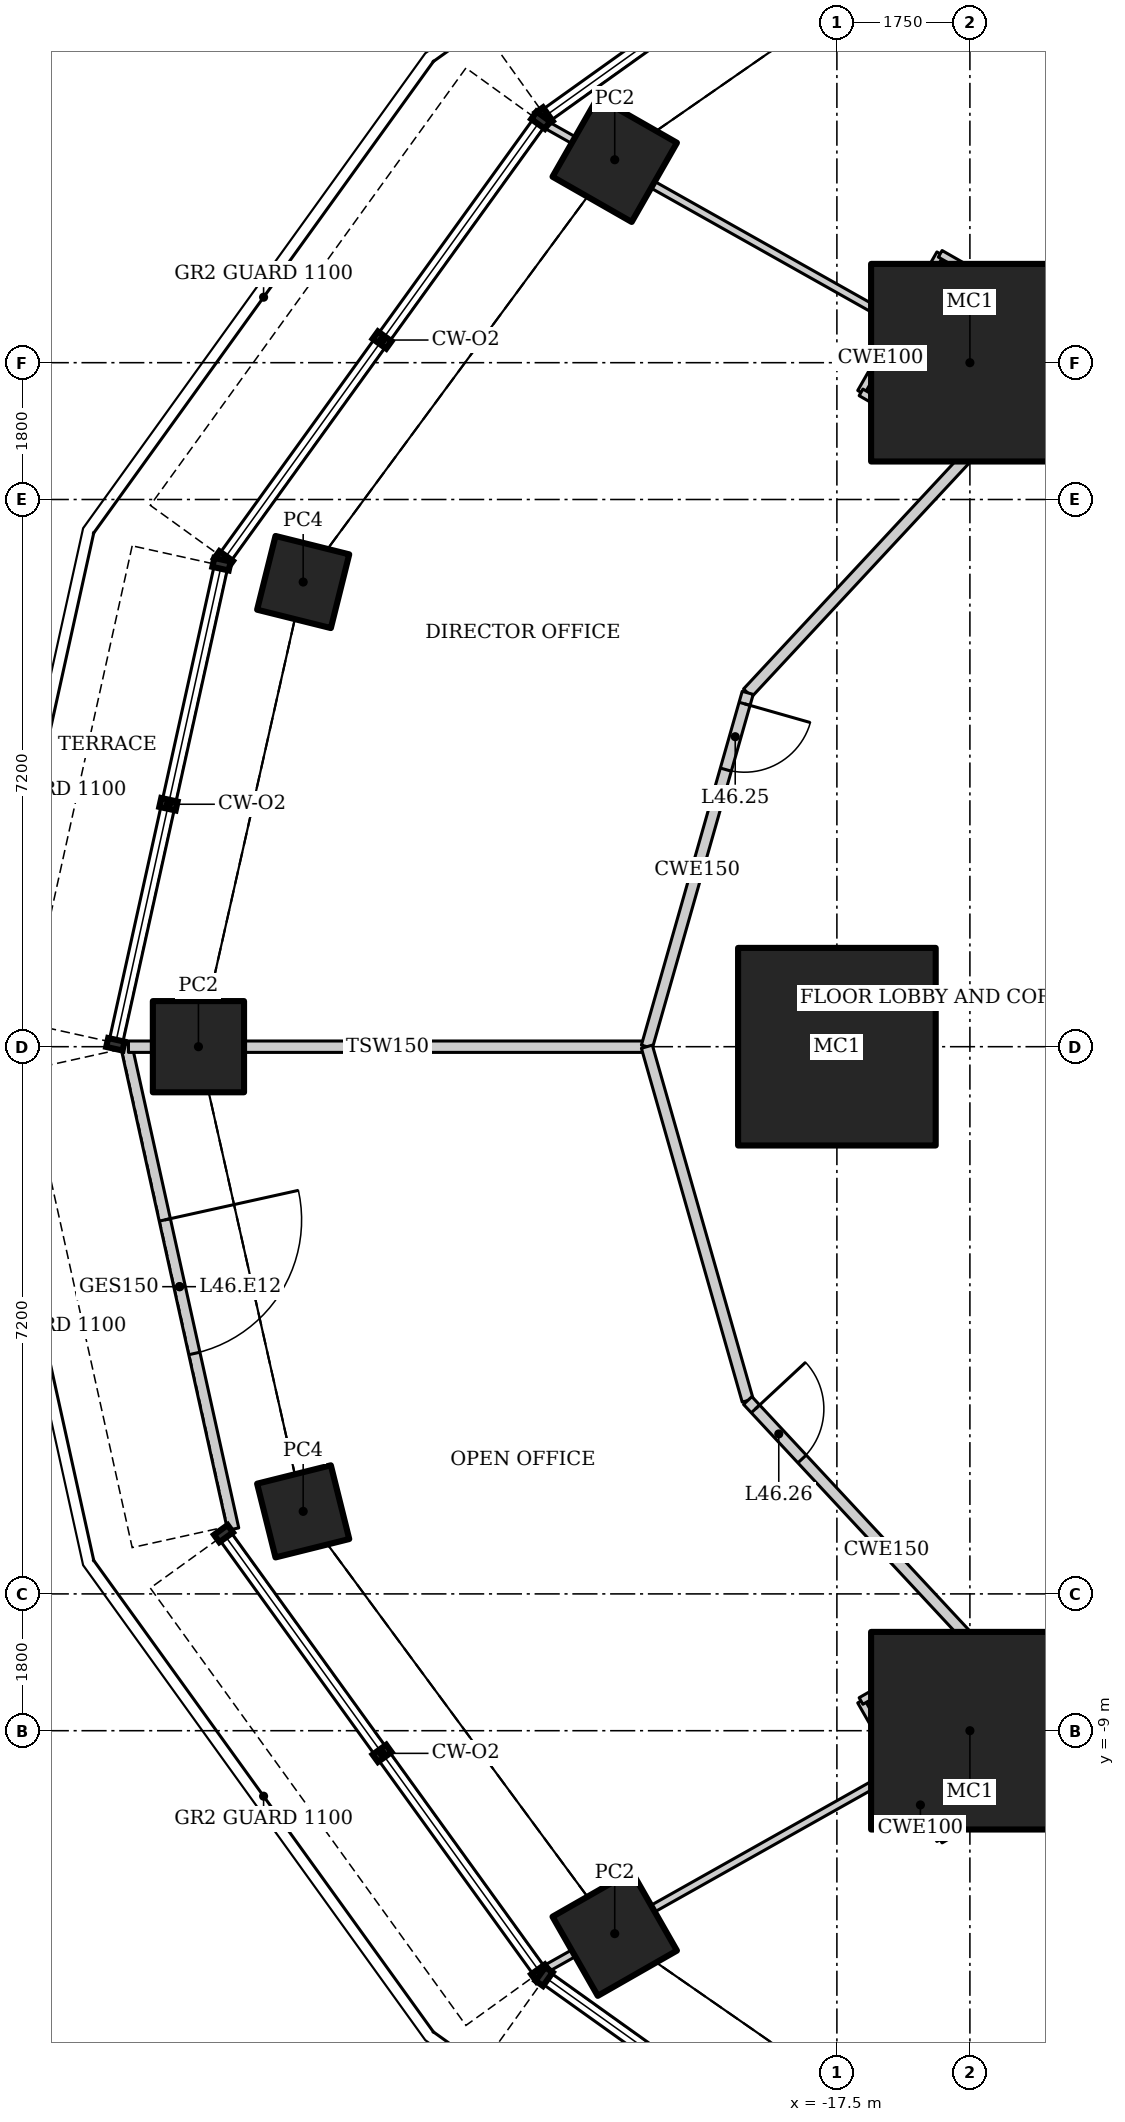
"""IFC4 building model, lengths in metres.
Left out: names, types, materials, properties, quantities, classifications, styles, units other than length and angle.
Written with IfcOpenShell. Run it as: python <this file> out.ifc"""

import sys

from ifc_helpers import new_model, si_unit, direction, frame, frame_2d, origin, origin_2d, place, context, subcontext, project, spatial, rectangle, hollow_rectangle, extrude, element, fill, save


model = new_model("IFC4")
c1 = context("Model", 3, precision=1e-05, world=origin(), true_north=direction((0.0, 1.0)))
c2 = subcontext(c1, "Body", "Model", "MODEL_VIEW")
j1 = project(units=[si_unit("LENGTHUNIT", "METRE"), si_unit("PLANEANGLEUNIT", "RADIAN")], contexts=[c1])
p1 = place(None, origin())
s1 = spatial("IfcSite", under=j1, at=p1, CompositionType="ELEMENT")
p2 = place(p1, origin())
s2 = spatial("IfcBuilding", under=s1, at=p2, CompositionType="ELEMENT")
p3 = place(p2, frame((0.0, 0.0, 199.0)))
s3 = spatial("IfcBuildingStorey", under=s2, at=p3, CompositionType="ELEMENT", Elevation=199.0)
for number, where, z_axis, x_axis in (
    (1, (-15.75, 9.0, 0.0), (0.0, 0.0, 1.0), (1.0, 0.0, 0.0)),
    (2, (-17.5, 0.0, 0.0), (0.0, 0.0, 1.0), (1.0, 0.0, 0.0)),
    (3, (-15.75, -9.0, 0.0), (0.0, 0.0, 1.0), (1.0, 0.0, 0.0)),
):
    element("IfcColumn", number, at=place(p3, frame(where, z_axis=z_axis, x_axis=x_axis)), inside=s3, PredefinedType="COLUMN", context=c2, shape_type="SweptSolid", body=[
        extrude(hollow_rectangle(XDim=2.6, YDim=2.6, WallThickness=0.13, at=origin_2d()), origin(), (0.0, 0.0, 1.0), 4.2),
    ])
p4 = place(p3, frame((-20.423, 11.67, 1.142), z_axis=(0.0, 0.0, 1.0), x_axis=(0.496139221777, 0.86824298017, 0.0)))
e4 = element("IfcColumn", 4, at=p4, inside=s3, PredefinedType="COLUMN", context=c2, shape_type="SweptSolid", body=[
    extrude(hollow_rectangle(XDim=1.2, YDim=1.2, WallThickness=0.1, at=origin_2d()), origin(), (0.0, 0.0, 1.0), 3.058),
])
p5 = place(p3, frame((-24.522, 6.114, 1.131), z_axis=(0.0, 0.0, 1.0), x_axis=(0.2419218956, 0.970295726276, 0.0)))
e5 = element("IfcColumn", 5, at=p5, inside=s3, PredefinedType="COLUMN", context=c2, shape_type="SweptSolid", body=[
    extrude(hollow_rectangle(XDim=1.0, YDim=1.0, WallThickness=0.08, at=origin_2d()), origin(), (0.0, 0.0, 1.0), 3.069),
])
p6 = place(p3, frame((-25.9, 0.0, 1.316), z_axis=(0.0, 0.0, 1.0), x_axis=(1.0, 0.0, 0.0)))
e6 = element("IfcColumn", 6, at=p6, inside=s3, PredefinedType="COLUMN", context=c2, shape_type="SweptSolid", body=[
    extrude(hollow_rectangle(XDim=1.2, YDim=1.2, WallThickness=0.1, at=origin_2d()), origin(), (0.0, 0.0, 1.0), 2.884),
])
p7 = place(p3, frame((-24.522, -6.114, 1.131), z_axis=(0.0, 0.0, 1.0), x_axis=(0.970295726276, 0.2419218956, 0.0)))
e7 = element("IfcColumn", 7, at=p7, inside=s3, PredefinedType="COLUMN", context=c2, shape_type="SweptSolid", body=[
    extrude(hollow_rectangle(XDim=1.0, YDim=1.0, WallThickness=0.08, at=origin_2d()), origin(), (0.0, 0.0, 1.0), 3.069),
])
p8 = place(p3, frame((-20.423, -11.67, 1.142), z_axis=(0.0, 0.0, 1.0), x_axis=(0.86824298017, 0.496139221777, 0.0)))
e8 = element("IfcColumn", 8, at=p8, inside=s3, PredefinedType="COLUMN", context=c2, shape_type="SweptSolid", body=[
    extrude(hollow_rectangle(XDim=1.2, YDim=1.2, WallThickness=0.1, at=origin_2d()), origin(), (0.0, 0.0, 1.0), 3.058),
])
p9 = place(p3, frame((-26.854, 0.032, 0.0), z_axis=(0.0, 0.0, 1.0), x_axis=(0.215885915817, -0.976418594329, 0.0)))
e9 = element("IfcWall", 9, at=p9, inside=s3, PredefinedType="ELEMENTEDWALL", context=c2, shape_type="SweptSolid", body=[
    extrude(rectangle(XDim=6.534, YDim=0.15, at=frame_2d((3.267, 0.0))), origin(), (0.0, 0.0, 1.0), 4.05),
])
p10 = place(p9, frame((2.367, 0.0, 0.0)))
e10 = element("IfcOpeningElement", 10, at=p10, cuts=e9, PredefinedType="OPENING", context=c2, shape_type="SweptSolid", body=[
    extrude(rectangle(XDim=1.8, YDim=2.4, at=frame_2d((0.9, 1.2))), frame((0.0, 0.085, 0.0), z_axis=(0.0, -1.0, 0.0), x_axis=(1.0, 0.0, 0.0)), (0.0, 0.0, 1.0), 0.17),
])
p11 = place(p3, frame((-21.358, 12.15, 0.0), z_axis=(0.0, 0.0, 1.0), x_axis=(0.871488555694, -0.490415841195, 0.0)))
e11 = element("IfcWall", 11, at=p11, inside=s3, PredefinedType="PARTITIONING", context=c2, shape_type="SweptSolid", body=[
    extrude(rectangle(XDim=7.272, YDim=0.1, at=frame_2d((3.636, 0.0))), origin(), (0.0, 0.0, 1.0), 2.85),
])
p12 = place(p3, frame((-26.821, 0.0, 0.0), z_axis=(0.0, 0.0, 1.0), x_axis=(1.0, 0.0, 0.0)))
e12 = element("IfcWall", 12, at=p12, inside=s3, PredefinedType="PARTITIONING", context=c2, shape_type="SweptSolid", body=[
    extrude(rectangle(XDim=6.821, YDim=0.15, at=frame_2d((3.41, 0.0))), origin(), (0.0, 0.0, 1.0), 2.85),
])
p13 = place(p3, frame((-21.358, -12.15, 0.0), z_axis=(0.0, 0.0, 1.0), x_axis=(0.871488555694, 0.490415841195, 0.0)))
e13 = element("IfcWall", 13, at=p13, inside=s3, PredefinedType="PARTITIONING", context=c2, shape_type="SweptSolid", body=[
    extrude(rectangle(XDim=7.272, YDim=0.1, at=frame_2d((3.636, 0.0))), origin(), (0.0, 0.0, 1.0), 2.85),
])
p14 = place(p3, frame((-10.633, 11.01, 0.0), z_axis=(0.0, 0.0, 1.0), x_axis=(-0.875044572696, -0.484042349176, 0.0)))
e14 = element("IfcWall", 14, at=p14, inside=s3, PredefinedType="PARTITIONING", context=c2, shape_type="SweptSolid", body=[
    extrude(rectangle(XDim=5.015, YDim=0.15, at=frame_2d((2.507, 0.0))), origin(), (0.0, 0.0, 1.0), 4.05),
])
p15 = place(p3, frame((-15.021, 8.583, 0.0), z_axis=(0.0, 0.0, 1.0), x_axis=(-0.681014838837, -0.732269615158, 0.0)))
e15 = element("IfcWall", 15, at=p15, inside=s3, PredefinedType="PARTITIONING", context=c2, shape_type="SweptSolid", body=[
    extrude(rectangle(XDim=5.364, YDim=0.15, at=frame_2d((2.682, 0.0))), origin(), (0.0, 0.0, 1.0), 4.05),
])
p16 = place(p3, frame((-18.673, 4.656, 0.0), z_axis=(0.0, 0.0, 1.0), x_axis=(-0.274041669067, -0.961717819121, 0.0)))
e16 = element("IfcWall", 16, at=p16, inside=s3, PredefinedType="PARTITIONING", context=c2, shape_type="SweptSolid", body=[
    extrude(rectangle(XDim=4.841, YDim=0.15, at=frame_2d((2.42, 0.0))), origin(), (0.0, 0.0, 1.0), 4.05),
])
p17 = place(p16, frame((0.15, 0.0, 0.0)))
e17 = element("IfcOpeningElement", 17, at=p17, cuts=e16, PredefinedType="OPENING", context=c2, shape_type="SweptSolid", body=[
    extrude(rectangle(XDim=0.9, YDim=2.1, at=frame_2d((0.45, 1.05))), frame((0.0, 0.085, 0.0), z_axis=(0.0, -1.0, 0.0), x_axis=(1.0, 0.0, 0.0)), (0.0, 0.0, 1.0), 0.17),
])
p18 = place(p3, frame((-20.0, 0.0, 0.0), z_axis=(0.0, 0.0, 1.0), x_axis=(0.274041669067, -0.961717819121, 0.0)))
e18 = element("IfcWall", 18, at=p18, inside=s3, PredefinedType="PARTITIONING", context=c2, shape_type="SweptSolid", body=[
    extrude(rectangle(XDim=4.841, YDim=0.15, at=frame_2d((2.42, 0.0))), origin(), (0.0, 0.0, 1.0), 4.05),
])
p19 = place(p3, frame((-18.673, -4.656, 0.0), z_axis=(0.0, 0.0, 1.0), x_axis=(0.681014838837, -0.732269615158, 0.0)))
e19 = element("IfcWall", 19, at=p19, inside=s3, PredefinedType="PARTITIONING", context=c2, shape_type="SweptSolid", body=[
    extrude(rectangle(XDim=5.364, YDim=0.15, at=frame_2d((2.682, 0.0))), origin(), (0.0, 0.0, 1.0), 4.05),
])
p20 = place(p19, frame((0.15, 0.0, 0.0)))
e20 = element("IfcOpeningElement", 20, at=p20, cuts=e19, PredefinedType="OPENING", context=c2, shape_type="SweptSolid", body=[
    extrude(rectangle(XDim=0.9, YDim=2.1, at=frame_2d((0.45, 1.05))), frame((0.0, 0.085, 0.0), z_axis=(0.0, -1.0, 0.0), x_axis=(1.0, 0.0, 0.0)), (0.0, 0.0, 1.0), 0.17),
])
p21 = place(p3, frame((-15.021, -8.583, 0.0), z_axis=(0.0, 0.0, 1.0), x_axis=(0.875044572696, -0.484042349176, 0.0)))
e21 = element("IfcWall", 21, at=p21, inside=s3, PredefinedType="PARTITIONING", context=c2, shape_type="SweptSolid", body=[
    extrude(rectangle(XDim=5.015, YDim=0.15, at=frame_2d((2.507, 0.0))), origin(), (0.0, 0.0, 1.0), 4.05),
])
p22 = place(p3, frame((-17.183, 8.609, 0.0), z_axis=(0.0, 0.0, 1.0), x_axis=(0.496214951439, 0.868199701664, 0.0)))
e22 = element("IfcWall", 22, at=p22, inside=s3, PredefinedType="PARTITIONING", context=c2, shape_type="SweptSolid", body=[
    extrude(rectangle(XDim=1.038, YDim=0.1, at=frame_2d((0.519, 0.0))), origin(), (0.0, 0.0, 1.0), 4.05),
])
for number, where, z_axis, x_axis in (
    (23, (-16.662, 9.521, 0.0), (0.0, 0.0, 1.0), (0.496, 0.868, 0.0)),
    (24, (-16.141, 10.433, 0.0), (0.0, 0.0, 1.0), (0.868, -0.496, 0.0)),
):
    element("IfcWall", number, at=place(p3, frame(where, z_axis=z_axis, x_axis=x_axis)), inside=s3, PredefinedType="PARTITIONING", context=c2, shape_type="SweptSolid", body=[
        extrude(rectangle(XDim=1.05, YDim=0.1, at=frame_2d((0.525, 0.0))), origin(), (0.0, 0.0, 1.0), 4.05),
    ])
p23 = place(p3, frame((-15.229, 9.912, 0.0), z_axis=(0.0, 0.0, 1.0), x_axis=(0.868243142124, -0.496138938357, 0.0)))
e25 = element("IfcWall", 25, at=p23, inside=s3, PredefinedType="PARTITIONING", context=c2, shape_type="SweptSolid", body=[
    extrude(rectangle(XDim=1.478, YDim=0.1, at=frame_2d((0.739, 0.0))), origin(), (0.0, 0.0, 1.0), 4.05),
])
p24 = place(p3, frame((-15.755, 7.794, 0.0), z_axis=(0.0, 0.0, 1.0), x_axis=(-0.868318998063, 0.496006166901, 0.0)))
e26 = element("IfcWall", 26, at=p24, inside=s3, PredefinedType="PARTITIONING", context=c2, shape_type="SweptSolid", body=[
    extrude(rectangle(XDim=0.594, YDim=0.1, at=frame_2d((0.297, 0.0))), origin(), (0.0, 0.0, 1.0), 4.05),
])
for number, where, z_axis, x_axis in (
    (27, (-16.271, 8.088, 0.0), (0.0, 0.0, 1.0), (-0.868, 0.496, 0.0)),
    (28, (-16.141, -10.433, 0.0), (0.0, 0.0, 1.0), (-0.496, 0.868, 0.0)),
):
    element("IfcWall", number, at=place(p3, frame(where, z_axis=z_axis, x_axis=x_axis)), inside=s3, PredefinedType="PARTITIONING", context=c2, shape_type="SweptSolid", body=[
        extrude(rectangle(XDim=1.05, YDim=0.1, at=frame_2d((0.525, 0.0))), origin(), (0.0, 0.0, 1.0), 4.05),
    ])
p25 = place(p3, frame((-16.668, -9.51, 0.0), z_axis=(0.0, 0.0, 1.0), x_axis=(-0.496214951439, 0.868199701664, 0.0)))
e29 = element("IfcWall", 29, at=p25, inside=s3, PredefinedType="PARTITIONING", context=c2, shape_type="SweptSolid", body=[
    extrude(rectangle(XDim=1.038, YDim=0.1, at=frame_2d((0.519, 0.0))), origin(), (0.0, 0.0, 1.0), 4.05),
])
p26 = place(p3, frame((-17.183, -8.609, 0.0), z_axis=(0.0, 0.0, 1.0), x_axis=(0.868214523334, 0.496189017888, 0.0)))
e30 = element("IfcWall", 30, at=p26, inside=s3, PredefinedType="PARTITIONING", context=c2, shape_type="SweptSolid", body=[
    extrude(rectangle(XDim=1.05, YDim=0.1, at=frame_2d((0.525, 0.0))), origin(), (0.0, 0.0, 1.0), 4.05),
])
p27 = place(p3, frame((-16.271, -8.088, 0.0), z_axis=(0.0, 0.0, 1.0), x_axis=(0.868318998063, 0.496006166901, 0.0)))
e31 = element("IfcWall", 31, at=p27, inside=s3, PredefinedType="PARTITIONING", context=c2, shape_type="SweptSolid", body=[
    extrude(rectangle(XDim=0.594, YDim=0.1, at=frame_2d((0.297, 0.0))), origin(), (0.0, 0.0, 1.0), 4.05),
])
p28 = place(p3, frame((-13.946, -9.178, 0.0), z_axis=(0.0, 0.0, 1.0), x_axis=(-0.868243142124, -0.496138938357, 0.0)))
e32 = element("IfcWall", 32, at=p28, inside=s3, PredefinedType="PARTITIONING", context=c2, shape_type="SweptSolid", body=[
    extrude(rectangle(XDim=1.478, YDim=0.1, at=frame_2d((0.739, 0.0))), origin(), (0.0, 0.0, 1.0), 4.05),
])
p29 = place(p3, frame((-15.229, -9.912, 0.0), z_axis=(0.0, 0.0, 1.0), x_axis=(-0.868214523334, -0.496189017888, 0.0)))
e33 = element("IfcWall", 33, at=p29, inside=s3, PredefinedType="PARTITIONING", context=c2, shape_type="SweptSolid", body=[
    extrude(rectangle(XDim=1.05, YDim=0.1, at=frame_2d((0.525, 0.0))), origin(), (0.0, 0.0, 1.0), 4.05),
])
p30 = place(p10, origin())
e34 = element("IfcDoor", 34, at=p30, inside=s3, OperationType="DOUBLE_DOOR_DOUBLE_SWING", PredefinedType="DOOR", context=c2, shape_type="SweptSolid", body=[
    extrude(rectangle(XDim=1.8, YDim=2.4, at=frame_2d((0.9, 1.2))), frame((0.0, 0.025, 0.0), z_axis=(0.0, -1.0, 0.0), x_axis=(1.0, 0.0, 0.0)), (0.0, 0.0, 1.0), 0.05),
])
fill(e10, e34)
p31 = place(p17, origin())
e35 = element("IfcDoor", 35, at=p31, inside=s3, OperationType="SINGLE_SWING_LEFT", PredefinedType="DOOR", context=c2, shape_type="SweptSolid", body=[
    extrude(rectangle(XDim=0.9, YDim=2.1, at=frame_2d((0.45, 1.05))), frame((0.0, 0.025, 0.0), z_axis=(0.0, -1.0, 0.0), x_axis=(1.0, 0.0, 0.0)), (0.0, 0.0, 1.0), 0.05),
])
fill(e17, e35)
p32 = place(p20, origin())
e36 = element("IfcDoor", 36, at=p32, inside=s3, OperationType="SINGLE_SWING_LEFT", PredefinedType="DOOR", context=c2, shape_type="SweptSolid", body=[
    extrude(rectangle(XDim=0.9, YDim=2.1, at=frame_2d((0.45, 1.05))), frame((0.0, 0.025, 0.0), z_axis=(0.0, -1.0, 0.0), x_axis=(1.0, 0.0, 0.0)), (0.0, 0.0, 1.0), 0.05),
])
fill(e20, e36)
save(model, sys.argv[1])
